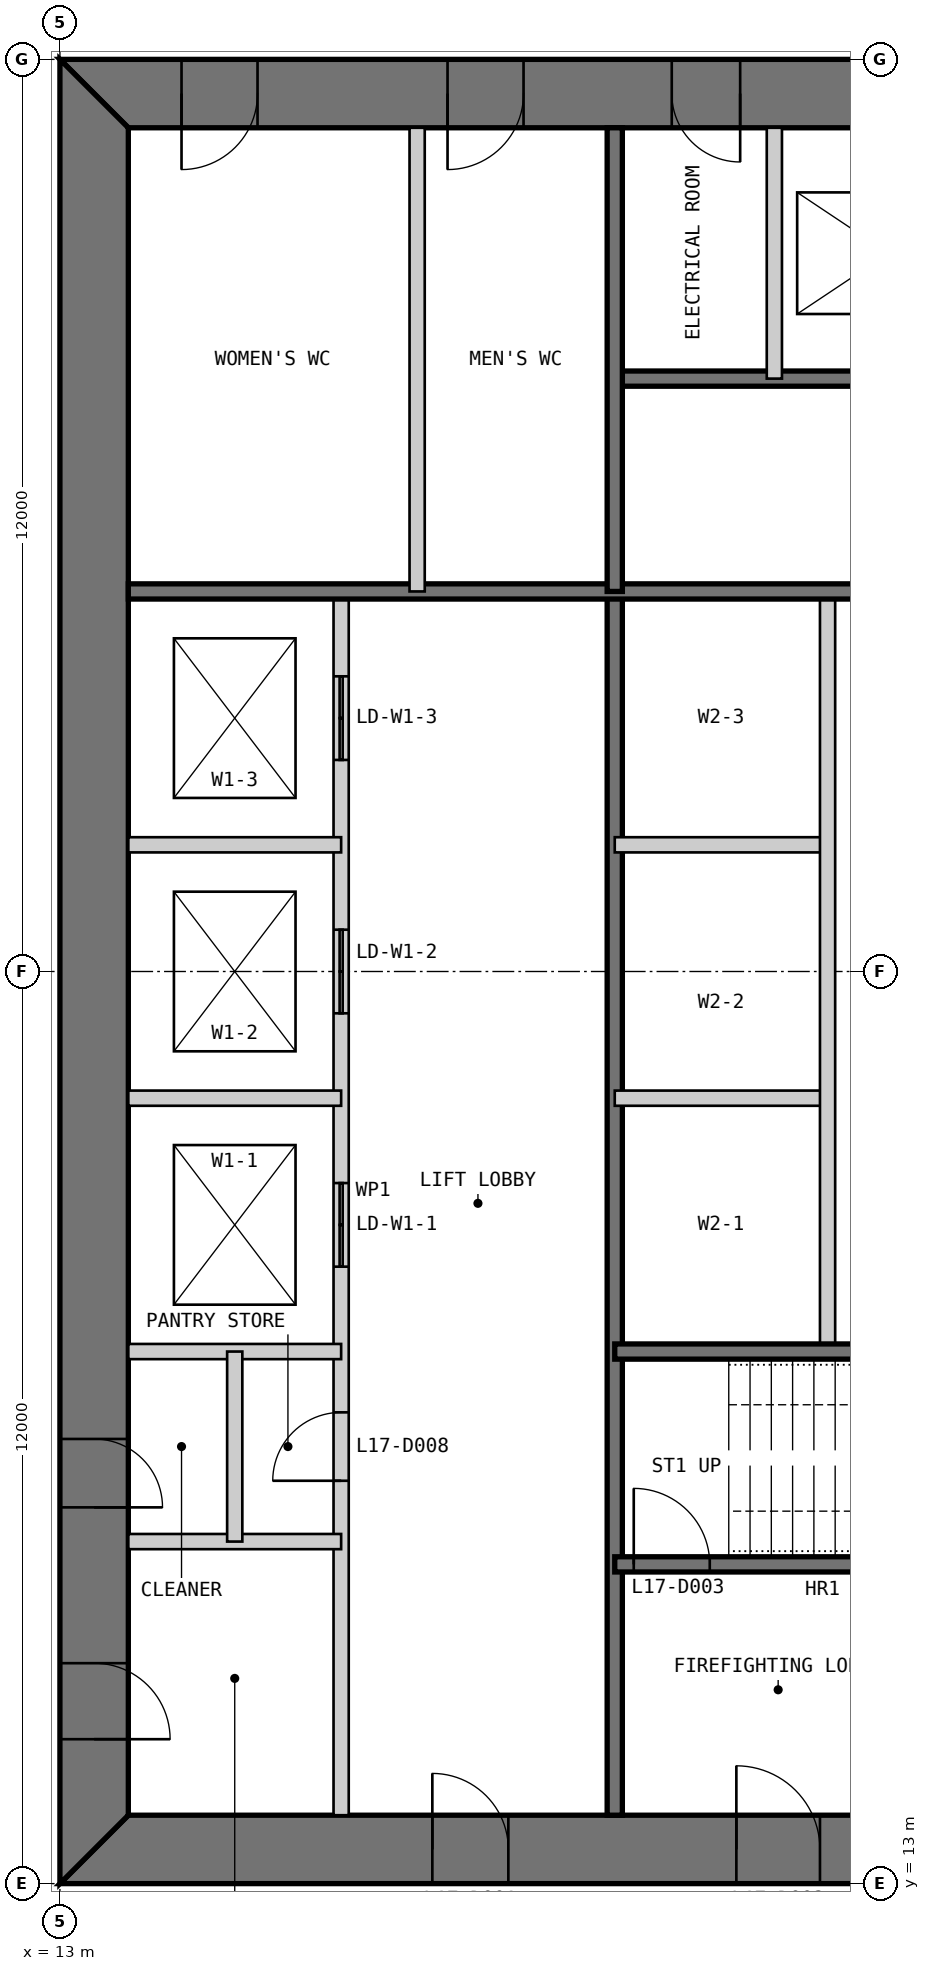
"""IFC4 building model, lengths in metres.
Left out: names, types, materials, properties, quantities, classifications, styles, units other than length and angle.
Written with IfcOpenShell. Run it as: python <this file> out.ifc"""

import sys

from ifc_helpers import new_model, si_unit, direction, frame, frame_2d, origin, place, context, subcontext, project, spatial, polyline, rectangle, outline, extrude, element, fill, save


model = new_model("IFC4")
c1 = context("Model", 3, precision=1e-05, world=origin(), true_north=direction((0.0, 1.0)))
c2 = subcontext(c1, "Body", "Model", "MODEL_VIEW")
j1 = project(units=[si_unit("LENGTHUNIT", "METRE"), si_unit("PLANEANGLEUNIT", "RADIAN")], contexts=[c1])
p1 = place(None, origin())
s1 = spatial("IfcSite", under=j1, at=p1, CompositionType="ELEMENT")
p2 = place(p1, origin())
s2 = spatial("IfcBuilding", under=s1, at=p2, CompositionType="ELEMENT")
p3 = place(p2, frame((0.0, 0.0, 75.0)))
s3 = spatial("IfcBuildingStorey", under=s2, at=p3, CompositionType="ELEMENT", Elevation=75.0)
p4 = place(p3, frame((13.0, 13.45, 0.0), z_axis=(0.0, 0.0, 1.0), x_axis=(1.0, 0.0, 0.0)))
e1 = element("IfcWall", 1, at=p4, inside=s3, PredefinedType="SHEAR", context=c2, shape_type="SweptSolid", body=[
    extrude(outline(polyline([(0.0, -0.45), (24.0, -0.45), (23.1, 0.45), (0.9, 0.45), (0.0, -0.45)])), origin(), (0.0, 0.0, 1.0), 4.0),
])
p5 = place(p4, frame((4.9, 0.0, 0.0)))
e2 = element("IfcOpeningElement", 2, at=p5, cuts=e1, PredefinedType="OPENING", context=c2, shape_type="SweptSolid", body=[
    extrude(rectangle(XDim=1.0, YDim=2.2, at=frame_2d((0.5, 1.1))), frame((0.0, 0.46, 0.0), z_axis=(0.0, -1.0, 0.0), x_axis=(1.0, 0.0, 0.0)), (0.0, 0.0, 1.0), 0.92),
])
p6 = place(p4, frame((8.9, 0.0, 0.0)))
e3 = element("IfcOpeningElement", 3, at=p6, cuts=e1, PredefinedType="OPENING", context=c2, shape_type="SweptSolid", body=[
    extrude(rectangle(XDim=1.1, YDim=2.2, at=frame_2d((0.55, 1.1))), frame((0.0, 0.46, 0.0), z_axis=(0.0, -1.0, 0.0), x_axis=(1.0, 0.0, 0.0)), (0.0, 0.0, 1.0), 0.92),
])
p7 = place(p4, frame((15.05, 0.0, 0.0)))
e4 = element("IfcOpeningElement", 4, at=p7, cuts=e1, PredefinedType="OPENING", context=c2, shape_type="SweptSolid", body=[
    extrude(rectangle(XDim=0.9, YDim=2.2, at=frame_2d((0.45, 1.1))), frame((0.0, 0.46, 0.0), z_axis=(0.0, -1.0, 0.0), x_axis=(1.0, 0.0, 0.0)), (0.0, 0.0, 1.0), 0.92),
])
p8 = place(p4, frame((17.9, 0.0, 0.0)))
e5 = element("IfcOpeningElement", 5, at=p8, cuts=e1, PredefinedType="OPENING", context=c2, shape_type="SweptSolid", body=[
    extrude(rectangle(XDim=1.0, YDim=2.2, at=frame_2d((0.5, 1.1))), frame((0.0, 0.46, 0.0), z_axis=(0.0, -1.0, 0.0), x_axis=(1.0, 0.0, 0.0)), (0.0, 0.0, 1.0), 0.92),
])
p9 = place(p4, frame((21.4, 0.0, 0.0)))
e6 = element("IfcOpeningElement", 6, at=p9, cuts=e1, PredefinedType="OPENING", context=c2, shape_type="SweptSolid", body=[
    extrude(rectangle(XDim=1.0, YDim=2.2, at=frame_2d((0.5, 1.1))), frame((0.0, 0.46, 0.0), z_axis=(0.0, -1.0, 0.0), x_axis=(1.0, 0.0, 0.0)), (0.0, 0.0, 1.0), 0.92),
])
p10 = place(p3, frame((37.0, 36.55, 0.0), z_axis=(0.0, 0.0, 1.0), x_axis=(-1.0, 0.0, 0.0)))
e7 = element("IfcWall", 7, at=p10, inside=s3, PredefinedType="SHEAR", context=c2, shape_type="SweptSolid", body=[
    extrude(outline(polyline([(0.0, -0.45), (24.0, -0.45), (23.1, 0.45), (0.9, 0.45), (0.0, -0.45)])), origin(), (0.0, 0.0, 1.0), 4.0),
])
p11 = place(p10, frame((4.9, 0.0, 0.0)))
e8 = element("IfcOpeningElement", 8, at=p11, cuts=e7, PredefinedType="OPENING", context=c2, shape_type="SweptSolid", body=[
    extrude(rectangle(XDim=1.0, YDim=2.2, at=frame_2d((0.5, 1.1))), frame((0.0, 0.46, 0.0), z_axis=(0.0, -1.0, 0.0), x_axis=(1.0, 0.0, 0.0)), (0.0, 0.0, 1.0), 0.92),
])
p12 = place(p10, frame((8.9, 0.0, 0.0)))
e9 = element("IfcOpeningElement", 9, at=p12, cuts=e7, PredefinedType="OPENING", context=c2, shape_type="SweptSolid", body=[
    extrude(rectangle(XDim=1.1, YDim=2.2, at=frame_2d((0.55, 1.1))), frame((0.0, 0.46, 0.0), z_axis=(0.0, -1.0, 0.0), x_axis=(1.0, 0.0, 0.0)), (0.0, 0.0, 1.0), 0.92),
])
p13 = place(p10, frame((15.05, 0.0, 0.0)))
e10 = element("IfcOpeningElement", 10, at=p13, cuts=e7, PredefinedType="OPENING", context=c2, shape_type="SweptSolid", body=[
    extrude(rectangle(XDim=0.9, YDim=2.2, at=frame_2d((0.45, 1.1))), frame((0.0, 0.46, 0.0), z_axis=(0.0, -1.0, 0.0), x_axis=(1.0, 0.0, 0.0)), (0.0, 0.0, 1.0), 0.92),
])
p14 = place(p10, frame((17.9, 0.0, 0.0)))
e11 = element("IfcOpeningElement", 11, at=p14, cuts=e7, PredefinedType="OPENING", context=c2, shape_type="SweptSolid", body=[
    extrude(rectangle(XDim=1.0, YDim=2.2, at=frame_2d((0.5, 1.1))), frame((0.0, 0.46, 0.0), z_axis=(0.0, -1.0, 0.0), x_axis=(1.0, 0.0, 0.0)), (0.0, 0.0, 1.0), 0.92),
])
p15 = place(p10, frame((21.4, 0.0, 0.0)))
e12 = element("IfcOpeningElement", 12, at=p15, cuts=e7, PredefinedType="OPENING", context=c2, shape_type="SweptSolid", body=[
    extrude(rectangle(XDim=1.0, YDim=2.2, at=frame_2d((0.5, 1.1))), frame((0.0, 0.46, 0.0), z_axis=(0.0, -1.0, 0.0), x_axis=(1.0, 0.0, 0.0)), (0.0, 0.0, 1.0), 0.92),
])
p16 = place(p3, frame((13.45, 36.1, 0.0), z_axis=(0.0, 0.0, 1.0), x_axis=(0.0, -1.0, 0.0)))
e13 = element("IfcWall", 13, at=p16, inside=s3, PredefinedType="SHEAR", context=c2, shape_type="SweptSolid", body=[
    extrude(outline(polyline([(-0.9, -0.45), (23.1, -0.45), (22.2, 0.45), (0.0, 0.45), (-0.9, -0.45)])), origin(), (0.0, 0.0, 1.0), 4.0),
])
p17 = place(p16, frame((20.2, 0.0, 0.0)))
e14 = element("IfcOpeningElement", 14, at=p17, cuts=e13, PredefinedType="OPENING", context=c2, shape_type="SweptSolid", body=[
    extrude(rectangle(XDim=1.0, YDim=2.2, at=frame_2d((0.5, 1.1))), frame((0.0, 0.46, 0.0), z_axis=(0.0, -1.0, 0.0), x_axis=(1.0, 0.0, 0.0)), (0.0, 0.0, 1.0), 0.92),
])
p18 = place(p16, frame((17.25, 0.0, 0.0)))
e15 = element("IfcOpeningElement", 15, at=p18, cuts=e13, PredefinedType="OPENING", context=c2, shape_type="SweptSolid", body=[
    extrude(rectangle(XDim=0.9, YDim=2.2, at=frame_2d((0.45, 1.1))), frame((0.0, 0.46, 0.0), z_axis=(0.0, -1.0, 0.0), x_axis=(1.0, 0.0, 0.0)), (0.0, 0.0, 1.0), 0.92),
])
p19 = place(p3, frame((16.7, 13.9, 0.0), z_axis=(0.0, 0.0, 1.0), x_axis=(0.0, 1.0, 0.0)))
e16 = element("IfcWall", 16, at=p19, inside=s3, PredefinedType="PARTITIONING", context=c2, shape_type="SweptSolid", body=[
    extrude(rectangle(XDim=16.1, YDim=0.2, at=frame_2d((8.05, 0.0))), origin(), (0.0, 0.0, 1.0), 3.8),
])
p20 = place(p19, frame((4.4, 0.0, 0.0)))
e17 = element("IfcOpeningElement", 17, at=p20, cuts=e16, PredefinedType="OPENING", context=c2, shape_type="SweptSolid", body=[
    extrude(rectangle(XDim=0.9, YDim=2.2, at=frame_2d((0.45, 1.1))), frame((0.0, 0.11, 0.0), z_axis=(0.0, -1.0, 0.0), x_axis=(1.0, 0.0, 0.0)), (0.0, 0.0, 1.0), 0.22),
])
p21 = place(p19, frame((7.217, 0.0, 0.0)))
e18 = element("IfcOpeningElement", 18, at=p21, cuts=e16, PredefinedType="OPENING", context=c2, shape_type="SweptSolid", body=[
    extrude(rectangle(XDim=1.1, YDim=2.2, at=frame_2d((0.55, 1.1))), frame((0.0, 0.11, 0.0), z_axis=(0.0, -1.0, 0.0), x_axis=(1.0, 0.0, 0.0)), (0.0, 0.0, 1.0), 0.22),
])
p22 = place(p19, frame((10.55, 0.0, 0.0)))
e19 = element("IfcOpeningElement", 19, at=p22, cuts=e16, PredefinedType="OPENING", context=c2, shape_type="SweptSolid", body=[
    extrude(rectangle(XDim=1.1, YDim=2.2, at=frame_2d((0.55, 1.1))), frame((0.0, 0.11, 0.0), z_axis=(0.0, -1.0, 0.0), x_axis=(1.0, 0.0, 0.0)), (0.0, 0.0, 1.0), 0.22),
])
p23 = place(p19, frame((13.883, 0.0, 0.0)))
e20 = element("IfcOpeningElement", 20, at=p23, cuts=e16, PredefinedType="OPENING", context=c2, shape_type="SweptSolid", body=[
    extrude(rectangle(XDim=1.1, YDim=2.2, at=frame_2d((0.55, 1.1))), frame((0.0, 0.11, 0.0), z_axis=(0.0, -1.0, 0.0), x_axis=(1.0, 0.0, 0.0)), (0.0, 0.0, 1.0), 0.22),
])
p24 = place(p3, frame((20.3, 13.9, 0.0), z_axis=(0.0, 0.0, 1.0), x_axis=(0.0, 1.0, 0.0)))
e21 = element("IfcWall", 21, at=p24, inside=s3, PredefinedType="SOLIDWALL", context=c2, shape_type="SweptSolid", body=[
    extrude(rectangle(XDim=16.1, YDim=0.2, at=frame_2d((8.05, 0.0))), origin(), (0.0, 0.0, 1.0), 3.8),
])
for number, where, z_axis, x_axis in (
    (22, (13.9, 20.0, 0.0), (0.0, 0.0, 1.0), (1.0, 0.0, 0.0)),
    (23, (13.9, 23.333, 0.0), (0.0, 0.0, 1.0), (1.0, 0.0, 0.0)),
    (24, (13.9, 26.667, 0.0), (0.0, 0.0, 1.0), (1.0, 0.0, 0.0)),
    (25, (20.3, 23.333, 0.0), (0.0, 0.0, 1.0), (1.0, 0.0, 0.0)),
    (26, (20.3, 26.667, 0.0), (0.0, 0.0, 1.0), (1.0, 0.0, 0.0)),
):
    element("IfcWall", number, at=place(p3, frame(where, z_axis=z_axis, x_axis=x_axis)), inside=s3, PredefinedType="PARTITIONING", context=c2, shape_type="SweptSolid", body=[
        extrude(rectangle(XDim=2.8, YDim=0.2, at=frame_2d((1.4, 0.0))), origin(), (0.0, 0.0, 1.0), 3.8),
    ])
p25 = place(p3, frame((23.1, 20.0, 0.0), z_axis=(0.0, 0.0, 1.0), x_axis=(0.0, 1.0, 0.0)))
e27 = element("IfcWall", 27, at=p25, inside=s3, PredefinedType="PARTITIONING", context=c2, shape_type="SweptSolid", body=[
    extrude(rectangle(XDim=10.0, YDim=0.2, at=frame_2d((5.0, 0.0))), origin(), (0.0, 0.0, 1.0), 3.8),
])
p26 = place(p3, frame((20.3, 17.2, 0.0), z_axis=(0.0, 0.0, 1.0), x_axis=(1.0, 0.0, 0.0)))
e28 = element("IfcWall", 28, at=p26, inside=s3, PredefinedType="SOLIDWALL", context=c2, shape_type="SweptSolid", body=[
    extrude(rectangle(XDim=9.4, YDim=0.2, at=frame_2d((4.7, 0.0))), origin(), (0.0, 0.0, 1.0), 3.8),
])
p27 = place(p26, frame((0.25, 0.0, 0.0)))
e29 = element("IfcOpeningElement", 29, at=p27, cuts=e28, PredefinedType="OPENING", context=c2, shape_type="SweptSolid", body=[
    extrude(rectangle(XDim=1.0, YDim=2.2, at=frame_2d((0.5, 1.1))), frame((0.0, 0.11, 0.0), z_axis=(0.0, -1.0, 0.0), x_axis=(1.0, 0.0, 0.0)), (0.0, 0.0, 1.0), 0.22),
])
p28 = place(p3, frame((20.3, 20.0, 0.0), z_axis=(0.0, 0.0, 1.0), x_axis=(1.0, 0.0, 0.0)))
e30 = element("IfcWall", 30, at=p28, inside=s3, PredefinedType="SOLIDWALL", context=c2, shape_type="SweptSolid", body=[
    extrude(rectangle(XDim=15.8, YDim=0.2, at=frame_2d((7.9, 0.0))), origin(), (0.0, 0.0, 1.0), 3.8),
])
p29 = place(p3, frame((13.9, 17.5, 0.0), z_axis=(0.0, 0.0, 1.0), x_axis=(1.0, 0.0, 0.0)))
e31 = element("IfcWall", 31, at=p29, inside=s3, PredefinedType="PARTITIONING", context=c2, shape_type="SweptSolid", body=[
    extrude(rectangle(XDim=2.8, YDim=0.2, at=frame_2d((1.4, 0.0))), origin(), (0.0, 0.0, 1.0), 3.8),
])
p30 = place(p3, frame((15.3, 17.5, 0.0), z_axis=(0.0, 0.0, 1.0), x_axis=(0.0, 1.0, 0.0)))
e32 = element("IfcWall", 32, at=p30, inside=s3, PredefinedType="PARTITIONING", context=c2, shape_type="SweptSolid", body=[
    extrude(rectangle(XDim=2.5, YDim=0.2, at=frame_2d((1.25, 0.0))), origin(), (0.0, 0.0, 1.0), 3.8),
])
p31 = place(p3, frame((29.7, 32.8, 0.0), z_axis=(0.0, 0.0, 1.0), x_axis=(-1.0, 0.0, 0.0)))
e33 = element("IfcWall", 33, at=p31, inside=s3, PredefinedType="SOLIDWALL", context=c2, shape_type="SweptSolid", body=[
    extrude(rectangle(XDim=9.4, YDim=0.2, at=frame_2d((4.7, 0.0))), origin(), (0.0, 0.0, 1.0), 3.8),
])
p32 = place(p31, frame((0.25, 0.0, 0.0)))
e34 = element("IfcOpeningElement", 34, at=p32, cuts=e33, PredefinedType="OPENING", context=c2, shape_type="SweptSolid", body=[
    extrude(rectangle(XDim=1.0, YDim=2.2, at=frame_2d((0.5, 1.1))), frame((0.0, 0.11, 0.0), z_axis=(0.0, -1.0, 0.0), x_axis=(1.0, 0.0, 0.0)), (0.0, 0.0, 1.0), 0.22),
])
p33 = place(p3, frame((29.7, 30.0, 0.0), z_axis=(0.0, 0.0, 1.0), x_axis=(-1.0, 0.0, 0.0)))
e35 = element("IfcWall", 35, at=p33, inside=s3, PredefinedType="SOLIDWALL", context=c2, shape_type="SweptSolid", body=[
    extrude(rectangle(XDim=15.8, YDim=0.2, at=frame_2d((7.9, 0.0))), origin(), (0.0, 0.0, 1.0), 3.8),
])
p34 = place(p3, frame((22.4, 36.1, 0.0), z_axis=(0.0, 0.0, 1.0), x_axis=(0.0, -1.0, 0.0)))
e36 = element("IfcWall", 36, at=p34, inside=s3, PredefinedType="PARTITIONING", context=c2, shape_type="SweptSolid", body=[
    extrude(rectangle(XDim=3.3, YDim=0.2, at=frame_2d((1.65, 0.0))), origin(), (0.0, 0.0, 1.0), 3.8),
])
p35 = place(p3, frame((20.3, 36.1, 0.0), z_axis=(0.0, 0.0, 1.0), x_axis=(0.0, -1.0, 0.0)))
e37 = element("IfcWall", 37, at=p35, inside=s3, PredefinedType="SOLIDWALL", context=c2, shape_type="SweptSolid", body=[
    extrude(rectangle(XDim=6.1, YDim=0.2, at=frame_2d((3.05, 0.0))), origin(), (0.0, 0.0, 1.0), 3.8),
])
p36 = place(p3, frame((17.7, 36.1, 0.0), z_axis=(0.0, 0.0, 1.0), x_axis=(0.0, -1.0, 0.0)))
e38 = element("IfcWall", 38, at=p36, inside=s3, PredefinedType="PARTITIONING", context=c2, shape_type="SweptSolid", body=[
    extrude(rectangle(XDim=6.1, YDim=0.2, at=frame_2d((3.05, 0.0))), origin(), (0.0, 0.0, 1.0), 3.8),
])
p37 = place(p5, origin())
e39 = element("IfcDoor", 39, at=p37, inside=s3, OperationType="SINGLE_SWING_LEFT", PredefinedType="DOOR", context=c2, shape_type="SweptSolid", body=[
    extrude(rectangle(XDim=1.0, YDim=2.2, at=frame_2d((0.5, 1.1))), frame((0.0, 0.025, 0.0), z_axis=(0.0, -1.0, 0.0), x_axis=(1.0, 0.0, 0.0)), (0.0, 0.0, 1.0), 0.05),
    extrude(outline(polyline([(0.0, 0.0), (0.04, 0.0), (0.04, 2.16), (0.96, 2.16), (0.96, 0.0), (1.0, 0.0), (1.0, 2.2), (0.0, 2.2), (0.0, 0.0)])), frame((0.0, 0.3, 0.0), z_axis=(0.0, -1.0, 0.0), x_axis=(1.0, 0.0, 0.0)), (0.0, 0.0, 1.0), 0.6),
])
fill(e2, e39)
p38 = place(p6, origin())
e40 = element("IfcDoor", 40, at=p38, inside=s3, OperationType="SINGLE_SWING_LEFT", PredefinedType="DOOR", context=c2, shape_type="SweptSolid", body=[
    extrude(rectangle(XDim=1.1, YDim=2.2, at=frame_2d((0.55, 1.1))), frame((0.0, 0.025, 0.0), z_axis=(0.0, -1.0, 0.0), x_axis=(1.0, 0.0, 0.0)), (0.0, 0.0, 1.0), 0.05),
    extrude(outline(polyline([(0.0, 0.0), (0.04, 0.0), (0.04, 2.16), (1.06, 2.16), (1.06, 0.0), (1.1, 0.0), (1.1, 2.2), (0.0, 2.2), (0.0, 0.0)])), frame((0.0, 0.3, 0.0), z_axis=(0.0, -1.0, 0.0), x_axis=(1.0, 0.0, 0.0)), (0.0, 0.0, 1.0), 0.6),
])
fill(e3, e40)
p39 = place(p27, origin())
e41 = element("IfcDoor", 41, at=p39, inside=s3, OperationType="SINGLE_SWING_LEFT", PredefinedType="DOOR", context=c2, shape_type="SweptSolid", body=[
    extrude(rectangle(XDim=1.0, YDim=2.2, at=frame_2d((0.5, 1.1))), frame((0.0, 0.025, 0.0), z_axis=(0.0, -1.0, 0.0), x_axis=(1.0, 0.0, 0.0)), (0.0, 0.0, 1.0), 0.05),
])
fill(e29, e41)
p40 = place(p17, origin())
e42 = element("IfcDoor", 42, at=p40, inside=s3, OperationType="SINGLE_SWING_RIGHT", PredefinedType="DOOR", context=c2, shape_type="SweptSolid", body=[
    extrude(rectangle(XDim=1.0, YDim=2.2, at=frame_2d((0.5, 1.1))), frame((0.0, 0.025, 0.0), z_axis=(0.0, -1.0, 0.0), x_axis=(1.0, 0.0, 0.0)), (0.0, 0.0, 1.0), 0.05),
    extrude(outline(polyline([(0.0, 0.0), (0.04, 0.0), (0.04, 2.16), (0.96, 2.16), (0.96, 0.0), (1.0, 0.0), (1.0, 2.2), (0.0, 2.2), (0.0, 0.0)])), frame((0.0, 0.3, 0.0), z_axis=(0.0, -1.0, 0.0), x_axis=(1.0, 0.0, 0.0)), (0.0, 0.0, 1.0), 0.6),
])
fill(e14, e42)
p41 = place(p20, origin())
e43 = element("IfcDoor", 43, at=p41, inside=s3, OperationType="SINGLE_SWING_LEFT", PredefinedType="DOOR", context=c2, shape_type="SweptSolid", body=[
    extrude(rectangle(XDim=0.9, YDim=2.2, at=frame_2d((0.45, 1.1))), frame((0.0, 0.025, 0.0), z_axis=(0.0, -1.0, 0.0), x_axis=(1.0, 0.0, 0.0)), (0.0, 0.0, 1.0), 0.05),
])
fill(e17, e43)
p42 = place(p18, origin())
e44 = element("IfcDoor", 44, at=p42, inside=s3, OperationType="SINGLE_SWING_RIGHT", PredefinedType="DOOR", context=c2, shape_type="SweptSolid", body=[
    extrude(rectangle(XDim=0.9, YDim=2.2, at=frame_2d((0.45, 1.1))), frame((0.0, 0.025, 0.0), z_axis=(0.0, -1.0, 0.0), x_axis=(1.0, 0.0, 0.0)), (0.0, 0.0, 1.0), 0.05),
    extrude(outline(polyline([(0.0, 0.0), (0.04, 0.0), (0.04, 2.16), (0.86, 2.16), (0.86, 0.0), (0.9, 0.0), (0.9, 2.2), (0.0, 2.2), (0.0, 0.0)])), frame((0.0, 0.3, 0.0), z_axis=(0.0, -1.0, 0.0), x_axis=(1.0, 0.0, 0.0)), (0.0, 0.0, 1.0), 0.6),
])
fill(e15, e44)
p43 = place(p13, origin())
e45 = element("IfcDoor", 45, at=p43, inside=s3, OperationType="SINGLE_SWING_LEFT", PredefinedType="DOOR", context=c2, shape_type="SweptSolid", body=[
    extrude(rectangle(XDim=0.9, YDim=2.2, at=frame_2d((0.45, 1.1))), frame((0.0, 0.025, 0.0), z_axis=(0.0, -1.0, 0.0), x_axis=(1.0, 0.0, 0.0)), (0.0, 0.0, 1.0), 0.05),
    extrude(outline(polyline([(0.0, 0.0), (0.04, 0.0), (0.04, 2.16), (0.86, 2.16), (0.86, 0.0), (0.9, 0.0), (0.9, 2.2), (0.0, 2.2), (0.0, 0.0)])), frame((0.0, 0.3, 0.0), z_axis=(0.0, -1.0, 0.0), x_axis=(1.0, 0.0, 0.0)), (0.0, 0.0, 1.0), 0.6),
])
fill(e10, e45)
p44 = place(p14, origin())
e46 = element("IfcDoor", 46, at=p44, inside=s3, OperationType="SINGLE_SWING_RIGHT", PredefinedType="DOOR", context=c2, shape_type="SweptSolid", body=[
    extrude(rectangle(XDim=1.0, YDim=2.2, at=frame_2d((0.5, 1.1))), frame((0.0, 0.025, 0.0), z_axis=(0.0, -1.0, 0.0), x_axis=(1.0, 0.0, 0.0)), (0.0, 0.0, 1.0), 0.05),
    extrude(outline(polyline([(0.0, 0.0), (0.04, 0.0), (0.04, 2.16), (0.96, 2.16), (0.96, 0.0), (1.0, 0.0), (1.0, 2.2), (0.0, 2.2), (0.0, 0.0)])), frame((0.0, 0.3, 0.0), z_axis=(0.0, -1.0, 0.0), x_axis=(1.0, 0.0, 0.0)), (0.0, 0.0, 1.0), 0.6),
])
fill(e11, e46)
p45 = place(p15, origin())
e47 = element("IfcDoor", 47, at=p45, inside=s3, OperationType="SINGLE_SWING_RIGHT", PredefinedType="DOOR", context=c2, shape_type="SweptSolid", body=[
    extrude(rectangle(XDim=1.0, YDim=2.2, at=frame_2d((0.5, 1.1))), frame((0.0, 0.025, 0.0), z_axis=(0.0, -1.0, 0.0), x_axis=(1.0, 0.0, 0.0)), (0.0, 0.0, 1.0), 0.05),
    extrude(outline(polyline([(0.0, 0.0), (0.04, 0.0), (0.04, 2.16), (0.96, 2.16), (0.96, 0.0), (1.0, 0.0), (1.0, 2.2), (0.0, 2.2), (0.0, 0.0)])), frame((0.0, 0.3, 0.0), z_axis=(0.0, -1.0, 0.0), x_axis=(1.0, 0.0, 0.0)), (0.0, 0.0, 1.0), 0.6),
])
fill(e12, e47)
p46 = place(p21, origin())
e48 = element("IfcDoor", 48, at=p46, inside=s3, OperationType="DOUBLE_DOOR_SLIDING", PredefinedType="DOOR", context=c2, shape_type="SweptSolid", body=[
    extrude(rectangle(XDim=1.1, YDim=2.2, at=frame_2d((0.55, 1.1))), frame((0.0, 0.025, 0.0), z_axis=(0.0, -1.0, 0.0), x_axis=(1.0, 0.0, 0.0)), (0.0, 0.0, 1.0), 0.05),
])
fill(e18, e48)
p47 = place(p22, origin())
e49 = element("IfcDoor", 49, at=p47, inside=s3, OperationType="DOUBLE_DOOR_SLIDING", PredefinedType="DOOR", context=c2, shape_type="SweptSolid", body=[
    extrude(rectangle(XDim=1.1, YDim=2.2, at=frame_2d((0.55, 1.1))), frame((0.0, 0.025, 0.0), z_axis=(0.0, -1.0, 0.0), x_axis=(1.0, 0.0, 0.0)), (0.0, 0.0, 1.0), 0.05),
])
fill(e19, e49)
p48 = place(p23, origin())
e50 = element("IfcDoor", 50, at=p48, inside=s3, OperationType="DOUBLE_DOOR_SLIDING", PredefinedType="DOOR", context=c2, shape_type="SweptSolid", body=[
    extrude(rectangle(XDim=1.1, YDim=2.2, at=frame_2d((0.55, 1.1))), frame((0.0, 0.025, 0.0), z_axis=(0.0, -1.0, 0.0), x_axis=(1.0, 0.0, 0.0)), (0.0, 0.0, 1.0), 0.05),
])
fill(e20, e50)
save(model, sys.argv[1])
